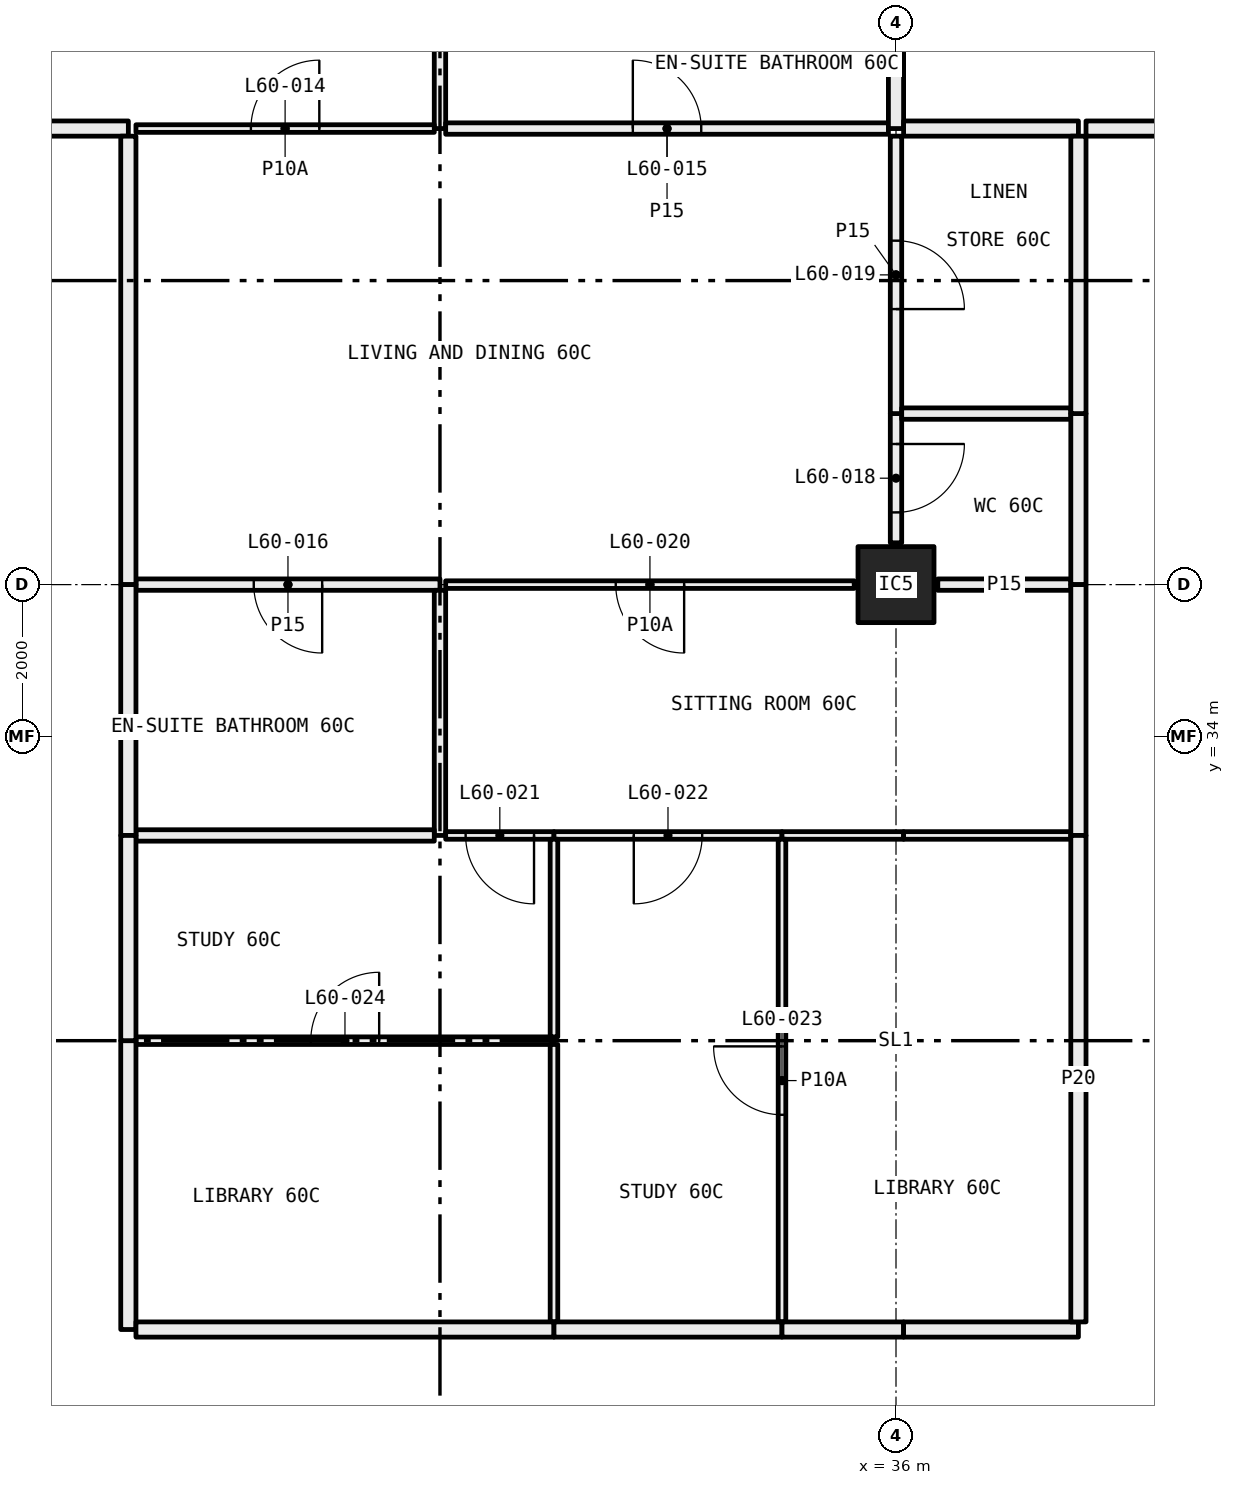
"""IFC4 building model, lengths in metres.
Left out: names, types, materials, properties, quantities, classifications, styles, units other than length and angle.
Written with IfcOpenShell. Run it as: python <this file> out.ifc"""

import sys

from ifc_helpers import new_model, si_unit, direction, frame, frame_2d, origin, origin_2d, place, context, subcontext, project, spatial, rectangle, hollow_rectangle, extrude, element, fill, save


model = new_model("IFC4")
c1 = context("Model", 3, precision=1e-05, world=origin(), true_north=direction((0.0, 1.0)))
c2 = subcontext(c1, "Body", "Model", "MODEL_VIEW")
j1 = project(units=[si_unit("LENGTHUNIT", "METRE"), si_unit("PLANEANGLEUNIT", "RADIAN")], contexts=[c1])
p1 = place(None, origin())
s1 = spatial("IfcSite", under=j1, at=p1, CompositionType="ELEMENT")
p2 = place(p1, origin())
s2 = spatial("IfcBuilding", under=s1, at=p2, CompositionType="ELEMENT")
p3 = place(p2, frame((0.0, 0.0, 224.85)))
s3 = spatial("IfcBuildingStorey", under=s2, at=p3, CompositionType="ELEMENT", Elevation=224.85)
p4 = place(p3, frame((36.0, 36.0, 0.0), z_axis=(0.0, 0.0, 1.0), x_axis=(1.0, 0.0, 0.0)))
e1 = element("IfcColumn", 1, at=p4, inside=s3, PredefinedType="COLUMN", context=c2, shape_type="SweptSolid", body=[
    extrude(hollow_rectangle(XDim=1.0, YDim=1.0, WallThickness=0.04, at=origin_2d()), origin(), (0.0, 0.0, 1.0), 3.05),
])
p5 = place(p3, frame((30.0, 42.0, 0.0), z_axis=(0.0, 0.0, 1.0), x_axis=(0.0, 1.0, 0.0)))
e2 = element("IfcWall", 2, at=p5, inside=s3, PredefinedType="PARTITIONING", context=c2, shape_type="SweptSolid", body=[
    extrude(rectangle(XDim=1.68, YDim=0.15, at=frame_2d((0.84, 0.0))), origin(), (0.0, 0.0, 1.0), 3.05),
])
p6 = place(p3, frame((26.0, 42.0, 0.0), z_axis=(0.0, 0.0, 1.0), x_axis=(1.0, 0.0, 0.0)))
e3 = element("IfcWall", 3, at=p6, inside=s3, PredefinedType="PARTITIONING", context=c2, shape_type="SweptSolid", body=[
    extrude(rectangle(XDim=3.925, YDim=0.1, at=frame_2d((1.962, 0.0))), origin(), (0.0, 0.0, 1.0), 3.05),
])
p7 = place(p6, frame((1.512, 0.0, 0.0)))
e4 = element("IfcOpeningElement", 4, at=p7, cuts=e3, PredefinedType="OPENING", context=c2, shape_type="SweptSolid", body=[
    extrude(rectangle(XDim=0.9, YDim=2.1, at=frame_2d((0.45, 1.05))), frame((0.0, 0.06, 0.0), z_axis=(0.0, -1.0, 0.0), x_axis=(1.0, 0.0, 0.0)), (0.0, 0.0, 1.0), 0.12),
])
p8 = place(p3, frame((24.0, 42.0, 0.0), z_axis=(0.0, 0.0, 1.0), x_axis=(1.0, 0.0, 0.0)))
e5 = element("IfcWall", 5, at=p8, inside=s3, PredefinedType="PARTITIONING", context=c2, shape_type="SweptSolid", body=[
    extrude(rectangle(XDim=1.9, YDim=0.2, at=frame_2d((0.95, 0.0))), origin(), (0.0, 0.0, 1.0), 3.05),
])
p9 = place(p3, frame((30.075, 42.0, 0.0), z_axis=(0.0, 0.0, 1.0), x_axis=(1.0, 0.0, 0.0)))
e6 = element("IfcWall", 6, at=p9, inside=s3, PredefinedType="PARTITIONING", context=c2, shape_type="SweptSolid", body=[
    extrude(rectangle(XDim=5.825, YDim=0.15, at=frame_2d((2.913, 0.0))), origin(), (0.0, 0.0, 1.0), 3.05),
])
p10 = place(p9, frame((2.462, 0.0, 0.0)))
e7 = element("IfcOpeningElement", 7, at=p10, cuts=e6, PredefinedType="OPENING", context=c2, shape_type="SweptSolid", body=[
    extrude(rectangle(XDim=0.9, YDim=2.1, at=frame_2d((0.45, 1.05))), frame((0.0, 0.085, 0.0), z_axis=(0.0, -1.0, 0.0), x_axis=(1.0, 0.0, 0.0)), (0.0, 0.0, 1.0), 0.17),
])
p11 = place(p3, frame((36.0, 42.0, 0.0), z_axis=(0.0, 0.0, 1.0), x_axis=(0.0, 1.0, 0.0)))
e8 = element("IfcWall", 8, at=p11, inside=s3, PredefinedType="PARTITIONING", context=c2, shape_type="SweptSolid", body=[
    extrude(rectangle(XDim=1.68, YDim=0.2, at=frame_2d((0.84, 0.0))), origin(), (0.0, 0.0, 1.0), 2.45),
])
p12 = place(p3, frame((36.0, 36.55, 0.0), z_axis=(0.0, 0.0, 1.0), x_axis=(0.0, 1.0, 0.0)))
e9 = element("IfcWall", 9, at=p12, inside=s3, PredefinedType="PARTITIONING", context=c2, shape_type="SweptSolid", body=[
    extrude(rectangle(XDim=1.7, YDim=0.15, at=frame_2d((0.85, 0.0))), origin(), (0.0, 0.0, 1.0), 2.45),
])
p13 = place(p12, frame((0.4, 0.0, 0.0)))
e10 = element("IfcOpeningElement", 10, at=p13, cuts=e9, PredefinedType="OPENING", context=c2, shape_type="SweptSolid", body=[
    extrude(rectangle(XDim=0.9, YDim=2.1, at=frame_2d((0.45, 1.05))), frame((0.0, 0.085, 0.0), z_axis=(0.0, -1.0, 0.0), x_axis=(1.0, 0.0, 0.0)), (0.0, 0.0, 1.0), 0.17),
])
p14 = place(p3, frame((36.0, 38.25, 0.0), z_axis=(0.0, 0.0, 1.0), x_axis=(0.0, 1.0, 0.0)))
e11 = element("IfcWall", 11, at=p14, inside=s3, PredefinedType="PARTITIONING", context=c2, shape_type="SweptSolid", body=[
    extrude(rectangle(XDim=3.65, YDim=0.15, at=frame_2d((1.825, 0.0))), origin(), (0.0, 0.0, 1.0), 2.45),
])
p15 = place(p14, frame((1.375, 0.0, 0.0)))
e12 = element("IfcOpeningElement", 12, at=p15, cuts=e11, PredefinedType="OPENING", context=c2, shape_type="SweptSolid", body=[
    extrude(rectangle(XDim=0.9, YDim=2.1, at=frame_2d((0.45, 1.05))), frame((0.0, 0.085, 0.0), z_axis=(0.0, -1.0, 0.0), x_axis=(1.0, 0.0, 0.0)), (0.0, 0.0, 1.0), 0.17),
])
p16 = place(p3, frame((26.0, 36.0, 0.0), z_axis=(0.0, 0.0, 1.0), x_axis=(1.0, 0.0, 0.0)))
e13 = element("IfcWall", 13, at=p16, inside=s3, PredefinedType="PARTITIONING", context=c2, shape_type="SweptSolid", body=[
    extrude(rectangle(XDim=4.0, YDim=0.15, at=frame_2d((2.0, 0.0))), origin(), (0.0, 0.0, 1.0), 2.45),
])
p17 = place(p16, frame((1.55, 0.0, 0.0)))
e14 = element("IfcOpeningElement", 14, at=p17, cuts=e13, PredefinedType="OPENING", context=c2, shape_type="SweptSolid", body=[
    extrude(rectangle(XDim=0.9, YDim=2.1, at=frame_2d((0.45, 1.05))), frame((0.0, 0.085, 0.0), z_axis=(0.0, -1.0, 0.0), x_axis=(1.0, 0.0, 0.0)), (0.0, 0.0, 1.0), 0.17),
])
p18 = place(p3, frame((30.075, 36.0, 0.0), z_axis=(0.0, 0.0, 1.0), x_axis=(1.0, 0.0, 0.0)))
e15 = element("IfcWall", 15, at=p18, inside=s3, PredefinedType="PARTITIONING", context=c2, shape_type="SweptSolid", body=[
    extrude(rectangle(XDim=5.375, YDim=0.1, at=frame_2d((2.688, 0.0))), origin(), (0.0, 0.0, 1.0), 2.45),
])
p19 = place(p18, frame((2.238, 0.0, 0.0)))
e16 = element("IfcOpeningElement", 16, at=p19, cuts=e15, PredefinedType="OPENING", context=c2, shape_type="SweptSolid", body=[
    extrude(rectangle(XDim=0.9, YDim=2.1, at=frame_2d((0.45, 1.05))), frame((0.0, 0.06, 0.0), z_axis=(0.0, -1.0, 0.0), x_axis=(1.0, 0.0, 0.0)), (0.0, 0.0, 1.0), 0.12),
])
p20 = place(p3, frame((25.9, 41.9, 0.0), z_axis=(0.0, 0.0, 1.0), x_axis=(0.0, -1.0, 0.0)))
e17 = element("IfcWall", 17, at=p20, inside=s3, PredefinedType="PARTITIONING", context=c2, shape_type="SweptSolid", body=[
    extrude(rectangle(XDim=5.9, YDim=0.2, at=frame_2d((2.95, 0.0))), origin(), (0.0, 0.0, 1.0), 2.45),
])
p21 = place(p3, frame((38.3, 38.25, 0.0), z_axis=(0.0, 0.0, 1.0), x_axis=(-1.0, 0.0, 0.0)))
e18 = element("IfcWall", 18, at=p21, inside=s3, PredefinedType="PARTITIONING", context=c2, shape_type="SweptSolid", body=[
    extrude(rectangle(XDim=2.225, YDim=0.15, at=frame_2d((1.113, 0.0))), origin(), (0.0, 0.0, 1.0), 2.45),
])
p22 = place(p3, frame((36.55, 36.0, 0.0), z_axis=(0.0, 0.0, 1.0), x_axis=(1.0, 0.0, 0.0)))
e19 = element("IfcWall", 19, at=p22, inside=s3, PredefinedType="PARTITIONING", context=c2, shape_type="SweptSolid", body=[
    extrude(rectangle(XDim=1.75, YDim=0.15, at=frame_2d((0.875, 0.0))), origin(), (0.0, 0.0, 1.0), 2.45),
])
p23 = place(p3, frame((38.4, 36.0, 0.0), z_axis=(0.0, 0.0, 1.0), x_axis=(0.0, 1.0, 0.0)))
e20 = element("IfcWall", 20, at=p23, inside=s3, PredefinedType="PARTITIONING", context=c2, shape_type="SweptSolid", body=[
    extrude(rectangle(XDim=2.25, YDim=0.2, at=frame_2d((1.125, 0.0))), origin(), (0.0, 0.0, 1.0), 2.45),
])
p24 = place(p3, frame((38.4, 42.0, 0.0), z_axis=(0.0, 0.0, 1.0), x_axis=(-1.0, 0.0, 0.0)))
e21 = element("IfcWall", 21, at=p24, inside=s3, PredefinedType="PARTITIONING", context=c2, shape_type="SweptSolid", body=[
    extrude(rectangle(XDim=2.3, YDim=0.2, at=frame_2d((1.15, 0.0))), origin(), (0.0, 0.0, 1.0), 3.05),
])
p25 = place(p3, frame((38.4, 38.25, 0.0), z_axis=(0.0, 0.0, 1.0), x_axis=(0.0, 1.0, 0.0)))
e22 = element("IfcWall", 22, at=p25, inside=s3, PredefinedType="PARTITIONING", context=c2, shape_type="SweptSolid", body=[
    extrude(rectangle(XDim=3.65, YDim=0.2, at=frame_2d((1.825, 0.0))), origin(), (0.0, 0.0, 1.0), 3.05),
])
p26 = place(p3, frame((30.0, 32.7, 0.0), z_axis=(0.0, 0.0, 1.0), x_axis=(0.0, 1.0, 0.0)))
e23 = element("IfcWall", 23, at=p26, inside=s3, PredefinedType="PARTITIONING", context=c2, shape_type="SweptSolid", body=[
    extrude(rectangle(XDim=3.225, YDim=0.15, at=frame_2d((1.613, 0.0))), origin(), (0.0, 0.0, 1.0), 2.45),
])
p27 = place(p3, frame((26.0, 32.7, 0.0), z_axis=(0.0, 0.0, 1.0), x_axis=(1.0, 0.0, 0.0)))
e24 = element("IfcWall", 24, at=p27, inside=s3, PredefinedType="PARTITIONING", context=c2, shape_type="SweptSolid", body=[
    extrude(rectangle(XDim=3.925, YDim=0.15, at=frame_2d((1.962, 0.0))), origin(), (0.0, 0.0, 1.0), 3.05),
])
p28 = place(p3, frame((25.9, 36.0, 0.0), z_axis=(0.0, 0.0, 1.0), x_axis=(0.0, -1.0, 0.0)))
e25 = element("IfcWall", 25, at=p28, inside=s3, PredefinedType="PARTITIONING", context=c2, shape_type="SweptSolid", body=[
    extrude(rectangle(XDim=3.3, YDim=0.2, at=frame_2d((1.65, 0.0))), origin(), (0.0, 0.0, 1.0), 2.45),
])
p29 = place(p3, frame((30.075, 32.7, 0.0), z_axis=(0.0, 0.0, 1.0), x_axis=(1.0, 0.0, 0.0)))
e26 = element("IfcWall", 26, at=p29, inside=s3, PredefinedType="PARTITIONING", context=c2, shape_type="SweptSolid", body=[
    extrude(rectangle(XDim=1.425, YDim=0.1, at=frame_2d((0.712, 0.0))), origin(), (0.0, 0.0, 1.0), 3.05),
])
p30 = place(p29, frame((0.262, 0.0, 0.0)))
e27 = element("IfcOpeningElement", 27, at=p30, cuts=e26, PredefinedType="OPENING", context=c2, shape_type="SweptSolid", body=[
    extrude(rectangle(XDim=0.9, YDim=2.1, at=frame_2d((0.45, 1.05))), frame((0.0, 0.06, 0.0), z_axis=(0.0, -1.0, 0.0), x_axis=(1.0, 0.0, 0.0)), (0.0, 0.0, 1.0), 0.12),
])
p31 = place(p3, frame((31.5, 32.7, 0.0), z_axis=(0.0, 0.0, 1.0), x_axis=(1.0, 0.0, 0.0)))
e28 = element("IfcWall", 28, at=p31, inside=s3, PredefinedType="PARTITIONING", context=c2, shape_type="SweptSolid", body=[
    extrude(rectangle(XDim=3.0, YDim=0.1, at=frame_2d((1.5, 0.0))), origin(), (0.0, 0.0, 1.0), 3.05),
])
p32 = place(p31, frame((1.05, 0.0, 0.0)))
e29 = element("IfcOpeningElement", 29, at=p32, cuts=e28, PredefinedType="OPENING", context=c2, shape_type="SweptSolid", body=[
    extrude(rectangle(XDim=0.9, YDim=2.1, at=frame_2d((0.45, 1.05))), frame((0.0, 0.06, 0.0), z_axis=(0.0, -1.0, 0.0), x_axis=(1.0, 0.0, 0.0)), (0.0, 0.0, 1.0), 0.12),
])
p33 = place(p3, frame((34.5, 32.7, 0.0), z_axis=(0.0, 0.0, 1.0), x_axis=(1.0, 0.0, 0.0)))
e30 = element("IfcWall", 30, at=p33, inside=s3, PredefinedType="PARTITIONING", context=c2, shape_type="SweptSolid", body=[
    extrude(rectangle(XDim=1.6, YDim=0.1, at=frame_2d((0.8, 0.0))), origin(), (0.0, 0.0, 1.0), 2.45),
])
p34 = place(p3, frame((36.1, 32.7, 0.0), z_axis=(0.0, 0.0, 1.0), x_axis=(1.0, 0.0, 0.0)))
e31 = element("IfcWall", 31, at=p34, inside=s3, PredefinedType="PARTITIONING", context=c2, shape_type="SweptSolid", body=[
    extrude(rectangle(XDim=2.2, YDim=0.1, at=frame_2d((1.1, 0.0))), origin(), (0.0, 0.0, 1.0), 3.05),
])
p35 = place(p3, frame((38.4, 32.7, 0.0), z_axis=(0.0, 0.0, 1.0), x_axis=(0.0, 1.0, 0.0)))
e32 = element("IfcWall", 32, at=p35, inside=s3, PredefinedType="PARTITIONING", context=c2, shape_type="SweptSolid", body=[
    extrude(rectangle(XDim=3.3, YDim=0.2, at=frame_2d((1.65, 0.0))), origin(), (0.0, 0.0, 1.0), 2.45),
])
p36 = place(p3, frame((31.5, 30.0, 0.0), z_axis=(0.0, 0.0, 1.0), x_axis=(-1.0, 0.0, 0.0)))
e33 = element("IfcWall", 33, at=p36, inside=s3, PredefinedType="PARTITIONING", context=c2, shape_type="SweptSolid", body=[
    extrude(rectangle(XDim=5.5, YDim=0.1, at=frame_2d((2.75, 0.0))), origin(), (0.0, 0.0, 1.0), 3.05),
])
p37 = place(p36, frame((2.3, 0.0, 0.0)))
e34 = element("IfcOpeningElement", 34, at=p37, cuts=e33, PredefinedType="OPENING", context=c2, shape_type="SweptSolid", body=[
    extrude(rectangle(XDim=0.9, YDim=2.1, at=frame_2d((0.45, 1.05))), frame((0.0, 0.06, 0.0), z_axis=(0.0, -1.0, 0.0), x_axis=(1.0, 0.0, 0.0)), (0.0, 0.0, 1.0), 0.12),
])
p38 = place(p3, frame((31.5, 26.3, 0.0), z_axis=(0.0, 0.0, 1.0), x_axis=(0.0, 1.0, 0.0)))
e35 = element("IfcWall", 35, at=p38, inside=s3, PredefinedType="PARTITIONING", context=c2, shape_type="SweptSolid", body=[
    extrude(rectangle(XDim=3.65, YDim=0.1, at=frame_2d((1.825, 0.0))), origin(), (0.0, 0.0, 1.0), 3.05),
])
p39 = place(p3, frame((25.9, 30.0, 0.0), z_axis=(0.0, 0.0, 1.0), x_axis=(0.0, -1.0, 0.0)))
e36 = element("IfcWall", 36, at=p39, inside=s3, PredefinedType="PARTITIONING", context=c2, shape_type="SweptSolid", body=[
    extrude(rectangle(XDim=3.8, YDim=0.2, at=frame_2d((1.9, 0.0))), origin(), (0.0, 0.0, 1.0), 3.05),
])
p40 = place(p3, frame((26.0, 26.2, 0.0), z_axis=(0.0, 0.0, 1.0), x_axis=(1.0, 0.0, 0.0)))
e37 = element("IfcWall", 37, at=p40, inside=s3, PredefinedType="PARTITIONING", context=c2, shape_type="SweptSolid", body=[
    extrude(rectangle(XDim=5.5, YDim=0.2, at=frame_2d((2.75, 0.0))), origin(), (0.0, 0.0, 1.0), 3.05),
])
p41 = place(p3, frame((31.5, 30.05, 0.0), z_axis=(0.0, 0.0, 1.0), x_axis=(0.0, 1.0, 0.0)))
e38 = element("IfcWall", 38, at=p41, inside=s3, PredefinedType="PARTITIONING", context=c2, shape_type="SweptSolid", body=[
    extrude(rectangle(XDim=2.6, YDim=0.1, at=frame_2d((1.3, 0.0))), origin(), (0.0, 0.0, 1.0), 3.05),
])
p42 = place(p3, frame((25.9, 32.7, 0.0), z_axis=(0.0, 0.0, 1.0), x_axis=(0.0, -1.0, 0.0)))
e39 = element("IfcWall", 39, at=p42, inside=s3, PredefinedType="PARTITIONING", context=c2, shape_type="SweptSolid", body=[
    extrude(rectangle(XDim=2.7, YDim=0.2, at=frame_2d((1.35, 0.0))), origin(), (0.0, 0.0, 1.0), 3.05),
])
p43 = place(p3, frame((34.5, 26.3, 0.0), z_axis=(0.0, 0.0, 1.0), x_axis=(0.0, 1.0, 0.0)))
e40 = element("IfcWall", 40, at=p43, inside=s3, PredefinedType="PARTITIONING", context=c2, shape_type="SweptSolid", body=[
    extrude(rectangle(XDim=6.35, YDim=0.1, at=frame_2d((3.175, 0.0))), origin(), (0.0, 0.0, 1.0), 3.05),
])
p44 = place(p43, frame((2.725, 0.0, 0.0)))
e41 = element("IfcOpeningElement", 41, at=p44, cuts=e40, PredefinedType="OPENING", context=c2, shape_type="SweptSolid", body=[
    extrude(rectangle(XDim=0.9, YDim=2.1, at=frame_2d((0.45, 1.05))), frame((0.0, 0.06, 0.0), z_axis=(0.0, -1.0, 0.0), x_axis=(1.0, 0.0, 0.0)), (0.0, 0.0, 1.0), 0.12),
])
p45 = place(p3, frame((31.5, 26.2, 0.0), z_axis=(0.0, 0.0, 1.0), x_axis=(1.0, 0.0, 0.0)))
e42 = element("IfcWall", 42, at=p45, inside=s3, PredefinedType="PARTITIONING", context=c2, shape_type="SweptSolid", body=[
    extrude(rectangle(XDim=3.0, YDim=0.2, at=frame_2d((1.5, 0.0))), origin(), (0.0, 0.0, 1.0), 3.05),
])
p46 = place(p3, frame((34.5, 26.2, 0.0), z_axis=(0.0, 0.0, 1.0), x_axis=(1.0, 0.0, 0.0)))
e43 = element("IfcWall", 43, at=p46, inside=s3, PredefinedType="PARTITIONING", context=c2, shape_type="SweptSolid", body=[
    extrude(rectangle(XDim=1.6, YDim=0.2, at=frame_2d((0.8, 0.0))), origin(), (0.0, 0.0, 1.0), 2.45),
])
p47 = place(p3, frame((36.1, 26.2, 0.0), z_axis=(0.0, 0.0, 1.0), x_axis=(1.0, 0.0, 0.0)))
e44 = element("IfcWall", 44, at=p47, inside=s3, PredefinedType="PARTITIONING", context=c2, shape_type="SweptSolid", body=[
    extrude(rectangle(XDim=2.3, YDim=0.2, at=frame_2d((1.15, 0.0))), origin(), (0.0, 0.0, 1.0), 3.05),
])
p48 = place(p3, frame((38.4, 26.3, 0.0), z_axis=(0.0, 0.0, 1.0), x_axis=(0.0, 1.0, 0.0)))
e45 = element("IfcWall", 45, at=p48, inside=s3, PredefinedType="PARTITIONING", context=c2, shape_type="SweptSolid", body=[
    extrude(rectangle(XDim=6.4, YDim=0.2, at=frame_2d((3.2, 0.0))), origin(), (0.0, 0.0, 1.0), 3.05),
])
p49 = place(p3, frame((38.5, 42.0, 0.0), z_axis=(0.0, 0.0, 1.0), x_axis=(1.0, 0.0, 0.0)))
e46 = element("IfcWall", 46, at=p49, inside=s3, PredefinedType="PARTITIONING", context=c2, shape_type="SweptSolid", body=[
    extrude(rectangle(XDim=2.3, YDim=0.2, at=frame_2d((1.15, 0.0))), origin(), (0.0, 0.0, 1.0), 3.05),
])
p50 = place(p7, origin())
e47 = element("IfcDoor", 47, at=p50, inside=s3, OperationType="SINGLE_SWING_LEFT", PredefinedType="DOOR", context=c2, shape_type="SweptSolid", body=[
    extrude(rectangle(XDim=0.9, YDim=2.1, at=frame_2d((0.45, 1.05))), frame((0.0, 0.025, 0.0), z_axis=(0.0, -1.0, 0.0), x_axis=(1.0, 0.0, 0.0)), (0.0, 0.0, 1.0), 0.05),
])
fill(e4, e47)
p51 = place(p10, origin())
e48 = element("IfcDoor", 48, at=p51, inside=s3, OperationType="SINGLE_SWING_RIGHT", PredefinedType="DOOR", context=c2, shape_type="SweptSolid", body=[
    extrude(rectangle(XDim=0.9, YDim=2.1, at=frame_2d((0.45, 1.05))), frame((0.0, 0.025, 0.0), z_axis=(0.0, -1.0, 0.0), x_axis=(1.0, 0.0, 0.0)), (0.0, 0.0, 1.0), 0.05),
])
fill(e7, e48)
p52 = place(p17, frame((0.9, 0.0, 0.0), x_axis=(-1.0, 0.0, 0.0)))
e49 = element("IfcDoor", 49, at=p52, inside=s3, OperationType="SINGLE_SWING_RIGHT", PredefinedType="DOOR", context=c2, shape_type="SweptSolid", body=[
    extrude(rectangle(XDim=0.9, YDim=2.1, at=frame_2d((0.45, 1.05))), frame((0.0, 0.025, 0.0), z_axis=(0.0, -1.0, 0.0), x_axis=(1.0, 0.0, 0.0)), (0.0, 0.0, 1.0), 0.05),
])
fill(e14, e49)
p53 = place(p13, frame((0.9, 0.0, 0.0), x_axis=(-1.0, 0.0, 0.0)))
e50 = element("IfcDoor", 50, at=p53, inside=s3, OperationType="SINGLE_SWING_RIGHT", PredefinedType="DOOR", context=c2, shape_type="SweptSolid", body=[
    extrude(rectangle(XDim=0.9, YDim=2.1, at=frame_2d((0.45, 1.05))), frame((0.0, 0.025, 0.0), z_axis=(0.0, -1.0, 0.0), x_axis=(1.0, 0.0, 0.0)), (0.0, 0.0, 1.0), 0.05),
])
fill(e10, e50)
p54 = place(p15, frame((0.9, 0.0, 0.0), x_axis=(-1.0, 0.0, 0.0)))
e51 = element("IfcDoor", 51, at=p54, inside=s3, OperationType="SINGLE_SWING_LEFT", PredefinedType="DOOR", context=c2, shape_type="SweptSolid", body=[
    extrude(rectangle(XDim=0.9, YDim=2.1, at=frame_2d((0.45, 1.05))), frame((0.0, 0.025, 0.0), z_axis=(0.0, -1.0, 0.0), x_axis=(1.0, 0.0, 0.0)), (0.0, 0.0, 1.0), 0.05),
])
fill(e12, e51)
p55 = place(p19, frame((0.9, 0.0, 0.0), x_axis=(-1.0, 0.0, 0.0)))
e52 = element("IfcDoor", 52, at=p55, inside=s3, OperationType="SINGLE_SWING_RIGHT", PredefinedType="DOOR", context=c2, shape_type="SweptSolid", body=[
    extrude(rectangle(XDim=0.9, YDim=2.1, at=frame_2d((0.45, 1.05))), frame((0.0, 0.025, 0.0), z_axis=(0.0, -1.0, 0.0), x_axis=(1.0, 0.0, 0.0)), (0.0, 0.0, 1.0), 0.05),
])
fill(e16, e52)
p56 = place(p30, frame((0.9, 0.0, 0.0), x_axis=(-1.0, 0.0, 0.0)))
e53 = element("IfcDoor", 53, at=p56, inside=s3, OperationType="SINGLE_SWING_RIGHT", PredefinedType="DOOR", context=c2, shape_type="SweptSolid", body=[
    extrude(rectangle(XDim=0.9, YDim=2.1, at=frame_2d((0.45, 1.05))), frame((0.0, 0.025, 0.0), z_axis=(0.0, -1.0, 0.0), x_axis=(1.0, 0.0, 0.0)), (0.0, 0.0, 1.0), 0.05),
])
fill(e27, e53)
p57 = place(p32, frame((0.9, 0.0, 0.0), x_axis=(-1.0, 0.0, 0.0)))
e54 = element("IfcDoor", 54, at=p57, inside=s3, OperationType="SINGLE_SWING_LEFT", PredefinedType="DOOR", context=c2, shape_type="SweptSolid", body=[
    extrude(rectangle(XDim=0.9, YDim=2.1, at=frame_2d((0.45, 1.05))), frame((0.0, 0.025, 0.0), z_axis=(0.0, -1.0, 0.0), x_axis=(1.0, 0.0, 0.0)), (0.0, 0.0, 1.0), 0.05),
])
fill(e29, e54)
p58 = place(p44, origin())
e55 = element("IfcDoor", 55, at=p58, inside=s3, OperationType="SINGLE_SWING_LEFT", PredefinedType="DOOR", context=c2, shape_type="SweptSolid", body=[
    extrude(rectangle(XDim=0.9, YDim=2.1, at=frame_2d((0.45, 1.05))), frame((0.0, 0.025, 0.0), z_axis=(0.0, -1.0, 0.0), x_axis=(1.0, 0.0, 0.0)), (0.0, 0.0, 1.0), 0.05),
])
fill(e41, e55)
p59 = place(p37, frame((0.9, 0.0, 0.0), x_axis=(-1.0, 0.0, 0.0)))
e56 = element("IfcDoor", 56, at=p59, inside=s3, OperationType="SINGLE_SWING_LEFT", PredefinedType="DOOR", context=c2, shape_type="SweptSolid", body=[
    extrude(rectangle(XDim=0.9, YDim=2.1, at=frame_2d((0.45, 1.05))), frame((0.0, 0.025, 0.0), z_axis=(0.0, -1.0, 0.0), x_axis=(1.0, 0.0, 0.0)), (0.0, 0.0, 1.0), 0.05),
])
fill(e34, e56)
save(model, sys.argv[1])
